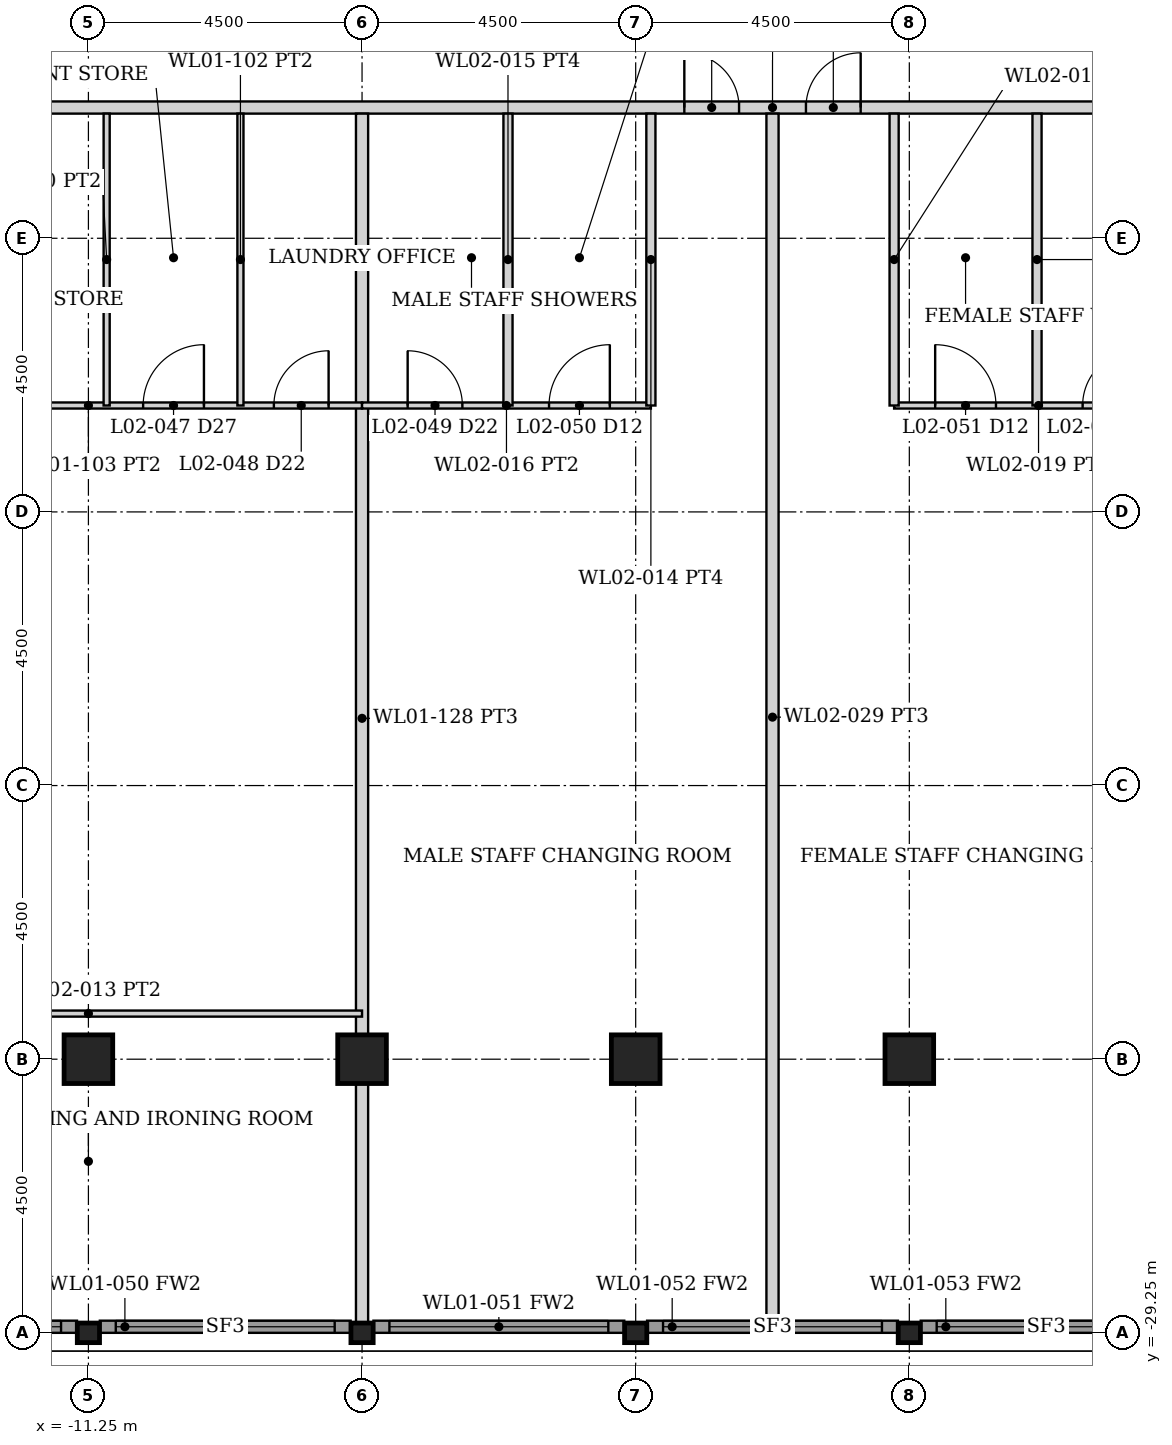
"""IFC4 building model, lengths in metres.
Left out: names, types, materials, properties, quantities, classifications, styles, units other than length and angle.
Written with IfcOpenShell. Run it as: python <this file> out.ifc"""

import sys

from ifc_helpers import new_model, si_unit, direction, frame, frame_2d, origin, origin_2d, place, context, subcontext, project, spatial, rectangle, hollow_rectangle, i_section, extrude, element, fill, save


model = new_model("IFC4")
c1 = context("Model", 3, precision=1e-05, world=origin(), true_north=direction((0.0, 1.0)))
c2 = subcontext(c1, "Body", "Model", "MODEL_VIEW")
j1 = project(units=[si_unit("LENGTHUNIT", "METRE"), si_unit("PLANEANGLEUNIT", "RADIAN")], contexts=[c1])
p1 = place(None, origin())
s1 = spatial("IfcSite", under=j1, at=p1, CompositionType="ELEMENT")
p2 = place(p1, origin())
s2 = spatial("IfcBuilding", under=s1, at=p2, CompositionType="ELEMENT")
p3 = place(p2, frame((0.0, 0.0, 11.0)))
s3 = spatial("IfcBuildingStorey", under=s2, at=p3, CompositionType="ELEMENT", Elevation=11.0)
for number, where, z_axis, x_axis in (
    (1, (-11.25, -24.75, 0.0), (0.0, 0.0, 1.0), (0.0, 1.0, 0.0)),
    (2, (-6.75, -24.75, 0.0), (0.0, 0.0, 1.0), (0.0, 1.0, 0.0)),
    (3, (-2.25, -24.75, 0.0), (0.0, 0.0, 1.0), (0.0, 1.0, 0.0)),
    (4, (2.25, -24.75, 0.0), (0.0, 0.0, 1.0), (0.0, 1.0, 0.0)),
):
    element("IfcColumn", number, at=place(p3, frame(where, z_axis=z_axis, x_axis=x_axis)), inside=s3, PredefinedType="COLUMN", context=c2, shape_type="SweptSolid", body=[
        extrude(hollow_rectangle(XDim=0.8, YDim=0.8, WallThickness=0.08, at=origin_2d()), origin(), (0.0, 0.0, 1.0), 5.0),
    ])
for number, where, z_axis, x_axis in (
    (5, (-11.25, -29.25, 0.0), (0.0, 0.0, 1.0), (0.0, 1.0, 0.0)),
    (6, (-6.75, -29.25, 0.0), (0.0, 0.0, 1.0), (0.0, 1.0, 0.0)),
    (7, (-2.25, -29.25, 0.0), (0.0, 0.0, 1.0), (0.0, 1.0, 0.0)),
    (8, (2.25, -29.25, 0.0), (0.0, 0.0, 1.0), (0.0, 1.0, 0.0)),
):
    element("IfcColumn", number, at=place(p3, frame(where, z_axis=z_axis, x_axis=x_axis)), inside=s3, PredefinedType="COLUMN", context=c2, shape_type="SweptSolid", body=[
        extrude(i_section(OverallWidth=0.322, OverallDepth=0.365, WebThickness=0.027, FlangeThickness=0.044, FilletRadius=0.015, at=origin_2d()), origin(), (0.0, 0.0, 1.0), 5.0),
    ])
p4 = place(p3, frame((-15.562, -29.15, 0.0), z_axis=(0.0, 0.0, 1.0), x_axis=(1.0, 0.0, 0.0)))
e9 = element("IfcWall", 9, at=p4, inside=s3, PredefinedType="SOLIDWALL", context=c2, shape_type="SweptSolid", body=[
    extrude(rectangle(XDim=4.125, YDim=0.2, at=frame_2d((2.062, 0.0))), origin(), (0.0, 0.0, 1.0), 4.133),
])
p5 = place(p4, frame((0.262, 0.0, 0.15)))
e10 = element("IfcOpeningElement", 10, at=p5, cuts=e9, PredefinedType="OPENING", context=c2, shape_type="SweptSolid", body=[
    extrude(rectangle(XDim=3.6, YDim=3.833, at=frame_2d((1.8, 1.917))), frame((0.0, 0.11, 0.0), z_axis=(0.0, -1.0, 0.0), x_axis=(1.0, 0.0, 0.0)), (0.0, 0.0, 1.0), 0.22),
])
p6 = place(p3, frame((-11.062, -29.15, 0.0), z_axis=(0.0, 0.0, 1.0), x_axis=(1.0, 0.0, 0.0)))
e11 = element("IfcWall", 11, at=p6, inside=s3, PredefinedType="SOLIDWALL", context=c2, shape_type="SweptSolid", body=[
    extrude(rectangle(XDim=4.125, YDim=0.2, at=frame_2d((2.062, 0.0))), origin(), (0.0, 0.0, 1.0), 4.133),
])
p7 = place(p6, frame((0.262, 0.0, 0.15)))
e12 = element("IfcOpeningElement", 12, at=p7, cuts=e11, PredefinedType="OPENING", context=c2, shape_type="SweptSolid", body=[
    extrude(rectangle(XDim=3.6, YDim=3.833, at=frame_2d((1.8, 1.917))), frame((0.0, 0.11, 0.0), z_axis=(0.0, -1.0, 0.0), x_axis=(1.0, 0.0, 0.0)), (0.0, 0.0, 1.0), 0.22),
])
p8 = place(p3, frame((-6.562, -29.15, 0.0), z_axis=(0.0, 0.0, 1.0), x_axis=(1.0, 0.0, 0.0)))
e13 = element("IfcWall", 13, at=p8, inside=s3, PredefinedType="SOLIDWALL", context=c2, shape_type="SweptSolid", body=[
    extrude(rectangle(XDim=4.125, YDim=0.2, at=frame_2d((2.062, 0.0))), origin(), (0.0, 0.0, 1.0), 4.133),
])
p9 = place(p8, frame((0.262, 0.0, 0.15)))
e14 = element("IfcOpeningElement", 14, at=p9, cuts=e13, PredefinedType="OPENING", context=c2, shape_type="SweptSolid", body=[
    extrude(rectangle(XDim=3.6, YDim=3.833, at=frame_2d((1.8, 1.917))), frame((0.0, 0.11, 0.0), z_axis=(0.0, -1.0, 0.0), x_axis=(1.0, 0.0, 0.0)), (0.0, 0.0, 1.0), 0.22),
])
p10 = place(p3, frame((-2.062, -29.15, 0.0), z_axis=(0.0, 0.0, 1.0), x_axis=(1.0, 0.0, 0.0)))
e15 = element("IfcWall", 15, at=p10, inside=s3, PredefinedType="SOLIDWALL", context=c2, shape_type="SweptSolid", body=[
    extrude(rectangle(XDim=4.125, YDim=0.2, at=frame_2d((2.062, 0.0))), origin(), (0.0, 0.0, 1.0), 4.133),
])
p11 = place(p10, frame((0.262, 0.0, 0.15)))
e16 = element("IfcOpeningElement", 16, at=p11, cuts=e15, PredefinedType="OPENING", context=c2, shape_type="SweptSolid", body=[
    extrude(rectangle(XDim=3.6, YDim=3.833, at=frame_2d((1.8, 1.917))), frame((0.0, 0.11, 0.0), z_axis=(0.0, -1.0, 0.0), x_axis=(1.0, 0.0, 0.0)), (0.0, 0.0, 1.0), 0.22),
])
p12 = place(p3, frame((2.438, -29.15, 0.0), z_axis=(0.0, 0.0, 1.0), x_axis=(1.0, 0.0, 0.0)))
e17 = element("IfcWall", 17, at=p12, inside=s3, PredefinedType="SOLIDWALL", context=c2, shape_type="SweptSolid", body=[
    extrude(rectangle(XDim=4.125, YDim=0.2, at=frame_2d((2.062, 0.0))), origin(), (0.0, 0.0, 1.0), 4.133),
])
p13 = place(p12, frame((0.262, 0.0, 0.15)))
e18 = element("IfcOpeningElement", 18, at=p13, cuts=e17, PredefinedType="OPENING", context=c2, shape_type="SweptSolid", body=[
    extrude(rectangle(XDim=3.6, YDim=3.833, at=frame_2d((1.8, 1.917))), frame((0.0, 0.11, 0.0), z_axis=(0.0, -1.0, 0.0), x_axis=(1.0, 0.0, 0.0)), (0.0, 0.0, 1.0), 0.22),
])
p14 = place(p3, frame((-25.075, -9.1, 0.0), z_axis=(0.0, 0.0, 1.0), x_axis=(1.0, 0.0, 0.0)))
e19 = element("IfcWall", 19, at=p14, inside=s3, PredefinedType="PARTITIONING", context=c2, shape_type="SweptSolid", body=[
    extrude(rectangle(XDim=50.15, YDim=0.2, at=frame_2d((25.075, 0.0))), origin(), (0.0, 0.0, 1.0), 3.829),
])
p15 = place(p14, frame((6.85, 0.0, 0.0)))
e20 = element("IfcOpeningElement", 20, at=p15, cuts=e19, PredefinedType="OPENING", context=c2, shape_type="SweptSolid", body=[
    extrude(rectangle(XDim=0.9, YDim=2.1, at=frame_2d((0.45, 1.05))), frame((0.0, 0.11, 0.0), z_axis=(0.0, -1.0, 0.0), x_axis=(1.0, 0.0, 0.0)), (0.0, 0.0, 1.0), 0.22),
])
p16 = place(p14, frame((23.625, 0.0, 0.0)))
e21 = element("IfcOpeningElement", 21, at=p16, cuts=e19, PredefinedType="OPENING", context=c2, shape_type="SweptSolid", body=[
    extrude(rectangle(XDim=0.9, YDim=2.1, at=frame_2d((0.45, 1.05))), frame((0.0, 0.11, 0.0), z_axis=(0.0, -1.0, 0.0), x_axis=(1.0, 0.0, 0.0)), (0.0, 0.0, 1.0), 0.22),
])
p17 = place(p14, frame((25.625, 0.0, 0.0)))
e22 = element("IfcOpeningElement", 22, at=p17, cuts=e19, PredefinedType="OPENING", context=c2, shape_type="SweptSolid", body=[
    extrude(rectangle(XDim=0.9, YDim=2.1, at=frame_2d((0.45, 1.05))), frame((0.0, 0.11, 0.0), z_axis=(0.0, -1.0, 0.0), x_axis=(1.0, 0.0, 0.0)), (0.0, 0.0, 1.0), 0.22),
])
p18 = place(p14, frame((32.475, 0.0, 0.0)))
e23 = element("IfcOpeningElement", 23, at=p18, cuts=e19, PredefinedType="OPENING", context=c2, shape_type="SweptSolid", body=[
    extrude(rectangle(XDim=0.9, YDim=2.1, at=frame_2d((0.45, 1.05))), frame((0.0, 0.11, 0.0), z_axis=(0.0, -1.0, 0.0), x_axis=(1.0, 0.0, 0.0)), (0.0, 0.0, 1.0), 0.22),
])
p19 = place(p14, frame((36.925, 0.0, 0.0)))
e24 = element("IfcOpeningElement", 24, at=p19, cuts=e19, PredefinedType="OPENING", context=c2, shape_type="SweptSolid", body=[
    extrude(rectangle(XDim=1.0, YDim=2.1, at=frame_2d((0.5, 1.05))), frame((0.0, 0.11, 0.0), z_axis=(0.0, -1.0, 0.0), x_axis=(1.0, 0.0, 0.0)), (0.0, 0.0, 1.0), 0.22),
])
p20 = place(p14, frame((42.4, 0.0, 0.0)))
e25 = element("IfcOpeningElement", 25, at=p20, cuts=e19, PredefinedType="OPENING", context=c2, shape_type="SweptSolid", body=[
    extrude(rectangle(XDim=0.9, YDim=2.1, at=frame_2d((0.45, 1.05))), frame((0.0, 0.11, 0.0), z_axis=(0.0, -1.0, 0.0), x_axis=(1.0, 0.0, 0.0)), (0.0, 0.0, 1.0), 0.22),
])
p21 = place(p3, frame((-6.75, -29.089, 0.0), z_axis=(0.0, 0.0, 1.0), x_axis=(0.0, 1.0, 0.0)))
e26 = element("IfcWall", 26, at=p21, inside=s3, PredefinedType="PARTITIONING", context=c2, shape_type="SweptSolid", body=[
    extrude(rectangle(XDim=19.889, YDim=0.2, at=frame_2d((9.944, 0.0))), origin(), (0.0, 0.0, 1.0), 3.829),
])
p22 = place(p3, frame((0.0, -29.05, 0.0), z_axis=(0.0, 0.0, 1.0), x_axis=(0.0, 1.0, 0.0)))
e27 = element("IfcWall", 27, at=p22, inside=s3, PredefinedType="PARTITIONING", context=c2, shape_type="SweptSolid", body=[
    extrude(rectangle(XDim=19.85, YDim=0.2, at=frame_2d((9.925, 0.0))), origin(), (0.0, 0.0, 1.0), 3.829),
])
p23 = place(p3, frame((-15.75, -14.0, 0.0), z_axis=(0.0, 0.0, 1.0), x_axis=(1.0, 0.0, 0.0)))
e28 = element("IfcWall", 28, at=p23, inside=s3, PredefinedType="PARTITIONING", context=c2, shape_type="SweptSolid", body=[
    extrude(rectangle(XDim=9.0, YDim=0.1, at=frame_2d((4.5, 0.0))), origin(), (0.0, 0.0, 1.0), 3.829),
])
p24 = place(p23, frame((1.9, 0.0, 0.0)))
e29 = element("IfcOpeningElement", 29, at=p24, cuts=e28, PredefinedType="OPENING", context=c2, shape_type="SweptSolid", body=[
    extrude(rectangle(XDim=1.0, YDim=2.1, at=frame_2d((0.5, 1.05))), frame((0.0, 0.06, 0.0), z_axis=(0.0, -1.0, 0.0), x_axis=(1.0, 0.0, 0.0)), (0.0, 0.0, 1.0), 0.12),
])
p25 = place(p23, frame((5.4, 0.0, 0.0)))
e30 = element("IfcOpeningElement", 30, at=p25, cuts=e28, PredefinedType="OPENING", context=c2, shape_type="SweptSolid", body=[
    extrude(rectangle(XDim=1.0, YDim=2.1, at=frame_2d((0.5, 1.05))), frame((0.0, 0.06, 0.0), z_axis=(0.0, -1.0, 0.0), x_axis=(1.0, 0.0, 0.0)), (0.0, 0.0, 1.0), 0.12),
])
p26 = place(p23, frame((7.55, 0.0, 0.0)))
e31 = element("IfcOpeningElement", 31, at=p26, cuts=e28, PredefinedType="OPENING", context=c2, shape_type="SweptSolid", body=[
    extrude(rectangle(XDim=0.9, YDim=2.1, at=frame_2d((0.45, 1.05))), frame((0.0, 0.06, 0.0), z_axis=(0.0, -1.0, 0.0), x_axis=(1.0, 0.0, 0.0)), (0.0, 0.0, 1.0), 0.12),
])
for number, where, z_axis, x_axis in (
    (32, (-10.95, -14.0, 0.0), (0.0, 0.0, 1.0), (0.0, 1.0, 0.0)),
    (33, (-8.75, -14.0, 0.0), (0.0, 0.0, 1.0), (0.0, 1.0, 0.0)),
):
    element("IfcWall", number, at=place(p3, frame(where, z_axis=z_axis, x_axis=x_axis)), inside=s3, PredefinedType="PARTITIONING", context=c2, shape_type="SweptSolid", body=[
        extrude(rectangle(XDim=4.8, YDim=0.1, at=frame_2d((2.4, 0.0))), origin(), (0.0, 0.0, 1.0), 3.829),
    ])
p27 = place(p3, frame((-15.75, -24.0, 0.0), z_axis=(0.0, 0.0, 1.0), x_axis=(1.0, 0.0, 0.0)))
e34 = element("IfcWall", 34, at=p27, inside=s3, PredefinedType="PARTITIONING", context=c2, shape_type="SweptSolid", body=[
    extrude(rectangle(XDim=9.0, YDim=0.1, at=frame_2d((4.5, 0.0))), origin(), (0.0, 0.0, 1.0), 3.829),
])
p28 = place(p27, frame((1.8, 0.0, 0.0)))
e35 = element("IfcOpeningElement", 35, at=p28, cuts=e34, PredefinedType="OPENING", context=c2, shape_type="SweptSolid", body=[
    extrude(rectangle(XDim=0.9, YDim=2.1, at=frame_2d((0.45, 1.05))), frame((0.0, 0.06, 0.0), z_axis=(0.0, -1.0, 0.0), x_axis=(1.0, 0.0, 0.0)), (0.0, 0.0, 1.0), 0.12),
])
p29 = place(p3, frame((-6.75, -14.0, 0.0), z_axis=(0.0, 0.0, 1.0), x_axis=(1.0, 0.0, 0.0)))
e36 = element("IfcWall", 36, at=p29, inside=s3, PredefinedType="PARTITIONING", context=c2, shape_type="SweptSolid", body=[
    extrude(rectangle(XDim=4.75, YDim=0.1, at=frame_2d((2.375, 0.0))), origin(), (0.0, 0.0, 1.0), 3.829),
])
p30 = place(p29, frame((0.75, 0.0, 0.0)))
e37 = element("IfcOpeningElement", 37, at=p30, cuts=e36, PredefinedType="OPENING", context=c2, shape_type="SweptSolid", body=[
    extrude(rectangle(XDim=0.9, YDim=2.1, at=frame_2d((0.45, 1.05))), frame((0.0, 0.06, 0.0), z_axis=(0.0, -1.0, 0.0), x_axis=(1.0, 0.0, 0.0)), (0.0, 0.0, 1.0), 0.12),
])
p31 = place(p29, frame((3.075, 0.0, 0.0)))
e38 = element("IfcOpeningElement", 38, at=p31, cuts=e36, PredefinedType="OPENING", context=c2, shape_type="SweptSolid", body=[
    extrude(rectangle(XDim=1.0, YDim=2.1, at=frame_2d((0.5, 1.05))), frame((0.0, 0.06, 0.0), z_axis=(0.0, -1.0, 0.0), x_axis=(1.0, 0.0, 0.0)), (0.0, 0.0, 1.0), 0.12),
])
for number, where, z_axis, x_axis in (
    (39, (-4.35, -14.0, 0.0), (0.0, 0.0, 1.0), (0.0, 1.0, 0.0)),
    (40, (-2.0, -14.0, 0.0), (0.0, 0.0, 1.0), (0.0, 1.0, 0.0)),
):
    element("IfcWall", number, at=place(p3, frame(where, z_axis=z_axis, x_axis=x_axis)), inside=s3, PredefinedType="PARTITIONING", context=c2, shape_type="SweptSolid", body=[
        extrude(rectangle(XDim=4.8, YDim=0.15, at=frame_2d((2.4, 0.0))), origin(), (0.0, 0.0, 1.0), 3.829),
    ])
p32 = place(p3, frame((2.0, -14.0, 0.0), z_axis=(0.0, 0.0, 1.0), x_axis=(1.0, 0.0, 0.0)))
e41 = element("IfcWall", 41, at=p32, inside=s3, PredefinedType="PARTITIONING", context=c2, shape_type="SweptSolid", body=[
    extrude(rectangle(XDim=4.75, YDim=0.1, at=frame_2d((2.375, 0.0))), origin(), (0.0, 0.0, 1.0), 3.829),
])
p33 = place(p32, frame((3.1, 0.0, 0.0)))
e42 = element("IfcOpeningElement", 42, at=p33, cuts=e41, PredefinedType="OPENING", context=c2, shape_type="SweptSolid", body=[
    extrude(rectangle(XDim=0.9, YDim=2.1, at=frame_2d((0.45, 1.05))), frame((0.0, 0.06, 0.0), z_axis=(0.0, -1.0, 0.0), x_axis=(1.0, 0.0, 0.0)), (0.0, 0.0, 1.0), 0.12),
])
p34 = place(p32, frame((0.675, 0.0, 0.0)))
e43 = element("IfcOpeningElement", 43, at=p34, cuts=e41, PredefinedType="OPENING", context=c2, shape_type="SweptSolid", body=[
    extrude(rectangle(XDim=1.0, YDim=2.1, at=frame_2d((0.5, 1.05))), frame((0.0, 0.06, 0.0), z_axis=(0.0, -1.0, 0.0), x_axis=(1.0, 0.0, 0.0)), (0.0, 0.0, 1.0), 0.12),
])
for number, where, z_axis, x_axis in (
    (44, (2.0, -14.0, 0.0), (0.0, 0.0, 1.0), (0.0, 1.0, 0.0)),
    (45, (4.35, -14.0, 0.0), (0.0, 0.0, 1.0), (0.0, 1.0, 0.0)),
):
    element("IfcWall", number, at=place(p3, frame(where, z_axis=z_axis, x_axis=x_axis)), inside=s3, PredefinedType="PARTITIONING", context=c2, shape_type="SweptSolid", body=[
        extrude(rectangle(XDim=4.8, YDim=0.15, at=frame_2d((2.4, 0.0))), origin(), (0.0, 0.0, 1.0), 3.829),
    ])
p35 = place(p5, origin())
e46 = element("IfcWindow", 46, at=p35, inside=s3, PartitioningType="SINGLE_PANEL", PredefinedType="WINDOW", context=c2, shape_type="SweptSolid", body=[
    extrude(rectangle(XDim=3.6, YDim=3.833, at=frame_2d((1.8, 1.917))), frame((0.0, 0.03, 0.0), z_axis=(0.0, -1.0, 0.0), x_axis=(1.0, 0.0, 0.0)), (0.0, 0.0, 1.0), 0.06),
])
fill(e10, e46)
p36 = place(p7, origin())
e47 = element("IfcWindow", 47, at=p36, inside=s3, PartitioningType="SINGLE_PANEL", PredefinedType="WINDOW", context=c2, shape_type="SweptSolid", body=[
    extrude(rectangle(XDim=3.6, YDim=3.833, at=frame_2d((1.8, 1.917))), frame((0.0, 0.03, 0.0), z_axis=(0.0, -1.0, 0.0), x_axis=(1.0, 0.0, 0.0)), (0.0, 0.0, 1.0), 0.06),
])
fill(e12, e47)
p37 = place(p9, origin())
e48 = element("IfcWindow", 48, at=p37, inside=s3, PartitioningType="SINGLE_PANEL", PredefinedType="WINDOW", context=c2, shape_type="SweptSolid", body=[
    extrude(rectangle(XDim=3.6, YDim=3.833, at=frame_2d((1.8, 1.917))), frame((0.0, 0.03, 0.0), z_axis=(0.0, -1.0, 0.0), x_axis=(1.0, 0.0, 0.0)), (0.0, 0.0, 1.0), 0.06),
])
fill(e14, e48)
p38 = place(p11, origin())
e49 = element("IfcWindow", 49, at=p38, inside=s3, PartitioningType="SINGLE_PANEL", PredefinedType="WINDOW", context=c2, shape_type="SweptSolid", body=[
    extrude(rectangle(XDim=3.6, YDim=3.833, at=frame_2d((1.8, 1.917))), frame((0.0, 0.03, 0.0), z_axis=(0.0, -1.0, 0.0), x_axis=(1.0, 0.0, 0.0)), (0.0, 0.0, 1.0), 0.06),
])
fill(e16, e49)
p39 = place(p13, origin())
e50 = element("IfcWindow", 50, at=p39, inside=s3, PartitioningType="SINGLE_PANEL", PredefinedType="WINDOW", context=c2, shape_type="SweptSolid", body=[
    extrude(rectangle(XDim=3.6, YDim=3.833, at=frame_2d((1.8, 1.917))), frame((0.0, 0.03, 0.0), z_axis=(0.0, -1.0, 0.0), x_axis=(1.0, 0.0, 0.0)), (0.0, 0.0, 1.0), 0.06),
])
fill(e18, e50)
p40 = place(p25, origin())
e51 = element("IfcDoor", 51, at=p40, inside=s3, OperationType="SINGLE_SWING_RIGHT", PredefinedType="DOOR", context=c2, shape_type="SweptSolid", body=[
    extrude(rectangle(XDim=1.0, YDim=2.1, at=frame_2d((0.5, 1.05))), frame((0.0, 0.025, 0.0), z_axis=(0.0, -1.0, 0.0), x_axis=(1.0, 0.0, 0.0)), (0.0, 0.0, 1.0), 0.05),
])
fill(e30, e51)
p41 = place(p26, origin())
e52 = element("IfcDoor", 52, at=p41, inside=s3, OperationType="SINGLE_SWING_RIGHT", PredefinedType="DOOR", context=c2, shape_type="SweptSolid", body=[
    extrude(rectangle(XDim=0.9, YDim=2.1, at=frame_2d((0.45, 1.05))), frame((0.0, 0.025, 0.0), z_axis=(0.0, -1.0, 0.0), x_axis=(1.0, 0.0, 0.0)), (0.0, 0.0, 1.0), 0.05),
])
fill(e31, e52)
p42 = place(p30, origin())
e53 = element("IfcDoor", 53, at=p42, inside=s3, OperationType="SINGLE_SWING_LEFT", PredefinedType="DOOR", context=c2, shape_type="SweptSolid", body=[
    extrude(rectangle(XDim=0.9, YDim=2.1, at=frame_2d((0.45, 1.05))), frame((0.0, 0.025, 0.0), z_axis=(0.0, -1.0, 0.0), x_axis=(1.0, 0.0, 0.0)), (0.0, 0.0, 1.0), 0.05),
])
fill(e37, e53)
p43 = place(p31, origin())
e54 = element("IfcDoor", 54, at=p43, inside=s3, OperationType="SINGLE_SWING_RIGHT", PredefinedType="DOOR", context=c2, shape_type="SweptSolid", body=[
    extrude(rectangle(XDim=1.0, YDim=2.1, at=frame_2d((0.5, 1.05))), frame((0.0, 0.025, 0.0), z_axis=(0.0, -1.0, 0.0), x_axis=(1.0, 0.0, 0.0)), (0.0, 0.0, 1.0), 0.05),
])
fill(e38, e54)
p44 = place(p16, origin())
e55 = element("IfcDoor", 55, at=p44, inside=s3, OperationType="SINGLE_SWING_LEFT", PredefinedType="DOOR", context=c2, shape_type="SweptSolid", body=[
    extrude(rectangle(XDim=0.9, YDim=2.1, at=frame_2d((0.45, 1.05))), frame((0.0, 0.025, 0.0), z_axis=(0.0, -1.0, 0.0), x_axis=(1.0, 0.0, 0.0)), (0.0, 0.0, 1.0), 0.05),
])
fill(e21, e55)
p45 = place(p33, origin())
e56 = element("IfcDoor", 56, at=p45, inside=s3, OperationType="SINGLE_SWING_RIGHT", PredefinedType="DOOR", context=c2, shape_type="SweptSolid", body=[
    extrude(rectangle(XDim=0.9, YDim=2.1, at=frame_2d((0.45, 1.05))), frame((0.0, 0.025, 0.0), z_axis=(0.0, -1.0, 0.0), x_axis=(1.0, 0.0, 0.0)), (0.0, 0.0, 1.0), 0.05),
])
fill(e42, e56)
p46 = place(p34, origin())
e57 = element("IfcDoor", 57, at=p46, inside=s3, OperationType="SINGLE_SWING_LEFT", PredefinedType="DOOR", context=c2, shape_type="SweptSolid", body=[
    extrude(rectangle(XDim=1.0, YDim=2.1, at=frame_2d((0.5, 1.05))), frame((0.0, 0.025, 0.0), z_axis=(0.0, -1.0, 0.0), x_axis=(1.0, 0.0, 0.0)), (0.0, 0.0, 1.0), 0.05),
])
fill(e43, e57)
p47 = place(p17, origin())
e58 = element("IfcDoor", 58, at=p47, inside=s3, OperationType="SINGLE_SWING_RIGHT", PredefinedType="DOOR", context=c2, shape_type="SweptSolid", body=[
    extrude(rectangle(XDim=0.9, YDim=2.1, at=frame_2d((0.45, 1.05))), frame((0.0, 0.025, 0.0), z_axis=(0.0, -1.0, 0.0), x_axis=(1.0, 0.0, 0.0)), (0.0, 0.0, 1.0), 0.05),
])
fill(e22, e58)
save(model, sys.argv[1])
